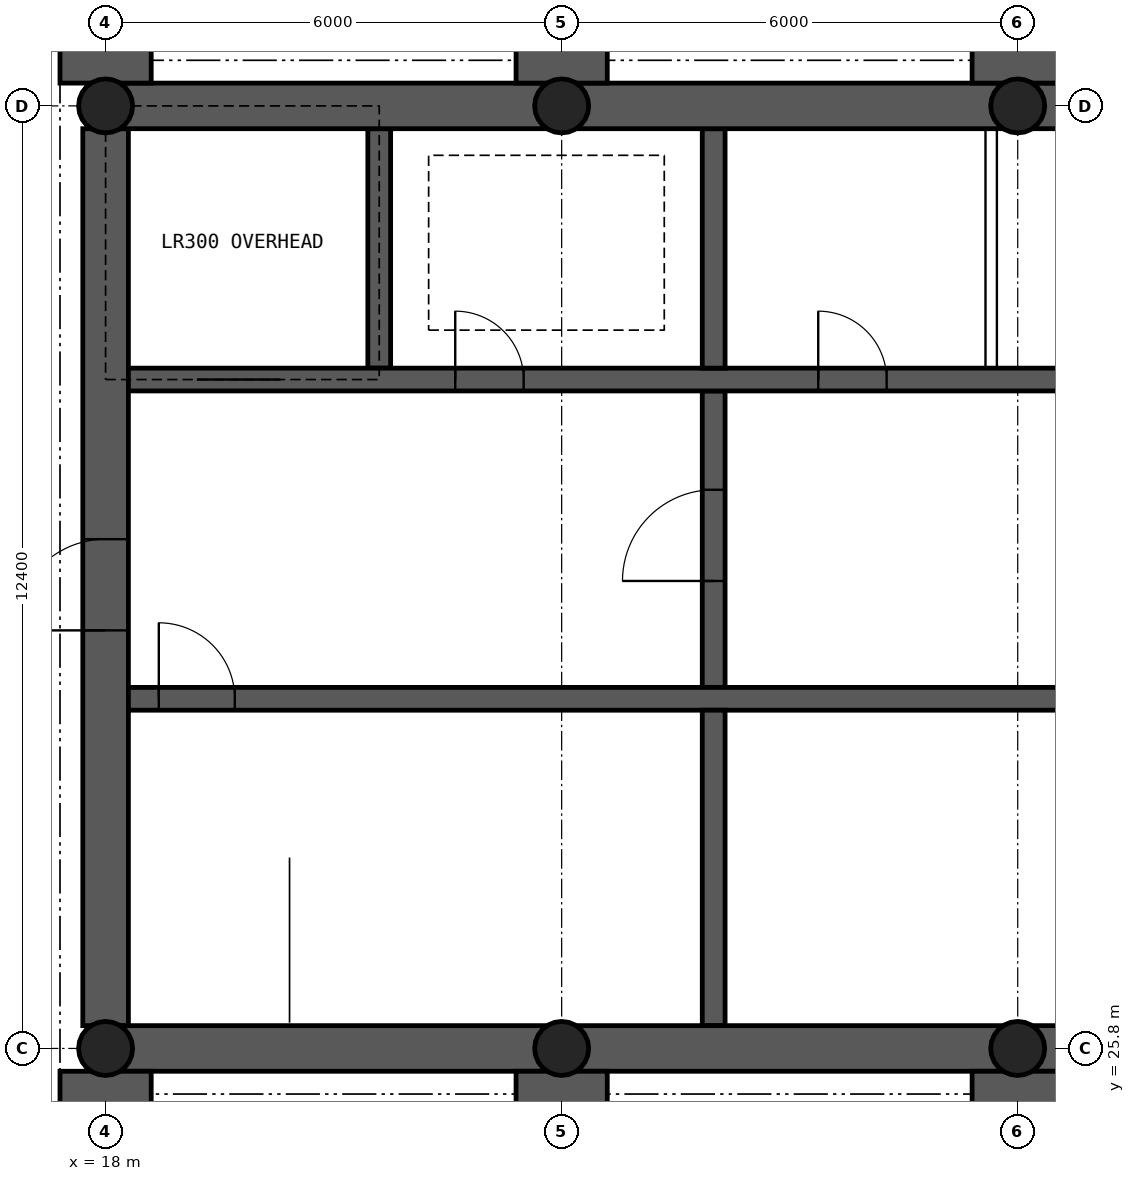
"""IFC4 building model, lengths in metres.
Left out: names, types, materials, properties, quantities, classifications, styles, units other than length and angle.
Written with IfcOpenShell. Run it as: python <this file> out.ifc"""

import sys

from ifc_helpers import new_model, si_unit, direction, frame, frame_2d, origin, origin_2d, place, context, subcontext, project, spatial, rectangle, hollow_circle, extrude, element, fill, save


model = new_model("IFC4")
c1 = context("Model", 3, precision=1e-05, world=origin(), true_north=direction((0.0, 1.0)))
c2 = subcontext(c1, "Body", "Model", "MODEL_VIEW")
j1 = project(units=[si_unit("LENGTHUNIT", "METRE"), si_unit("PLANEANGLEUNIT", "RADIAN")], contexts=[c1])
p1 = place(None, origin())
s1 = spatial("IfcSite", under=j1, at=p1, CompositionType="ELEMENT")
p2 = place(p1, origin())
s2 = spatial("IfcBuilding", under=s1, at=p2, CompositionType="ELEMENT")
p3 = place(p2, frame((0.0, 0.0, 262.3)))
s3 = spatial("IfcBuildingStorey", under=s2, at=p3, CompositionType="ELEMENT", Elevation=262.3)
for number, where, z_axis, x_axis in (
    (1, (18.0, 25.8, 0.0), (0.0, 0.0, 1.0), (1.0, 0.0, 0.0)),
    (2, (18.0, 38.2, 0.0), (0.0, 0.0, 1.0), (1.0, 0.0, 0.0)),
):
    element("IfcWall", number, at=place(p3, frame(where, z_axis=z_axis, x_axis=x_axis)), inside=s3, PredefinedType="SHEAR", context=c2, shape_type="SweptSolid", body=[
        extrude(rectangle(XDim=48.0, YDim=0.6, at=frame_2d((24.0, 0.0))), origin(), (0.0, 0.0, 1.0), 6.0),
    ])
p4 = place(p3, frame((18.0, 26.1, 0.0), z_axis=(0.0, 0.0, 1.0), x_axis=(0.0, 1.0, 0.0)))
e3 = element("IfcWall", 3, at=p4, inside=s3, PredefinedType="SHEAR", context=c2, shape_type="SweptSolid", body=[
    extrude(rectangle(XDim=11.8, YDim=0.6, at=frame_2d((5.9, 0.0))), origin(), (0.0, 0.0, 1.0), 6.0),
])
p5 = place(p4, frame((5.2, 0.0, 0.0)))
e4 = element("IfcOpeningElement", 4, at=p5, cuts=e3, PredefinedType="OPENING", context=c2, shape_type="SweptSolid", body=[
    extrude(rectangle(XDim=1.2, YDim=2.1, at=frame_2d((0.6, 1.05))), frame((0.0, 0.31, 0.0), z_axis=(0.0, -1.0, 0.0), x_axis=(1.0, 0.0, 0.0)), (0.0, 0.0, 1.0), 0.62),
])
p6 = place(p3, frame((18.3, 30.4, 0.0), z_axis=(0.0, 0.0, 1.0), x_axis=(1.0, 0.0, 0.0)))
e5 = element("IfcWall", 5, at=p6, inside=s3, PredefinedType="SHEAR", context=c2, shape_type="SweptSolid", body=[
    extrude(rectangle(XDim=47.4, YDim=0.3, at=frame_2d((23.7, 0.0))), origin(), (0.0, 0.0, 1.0), 6.0),
])
p7 = place(p6, frame((0.4, 0.0, 0.0)))
e6 = element("IfcOpeningElement", 6, at=p7, cuts=e5, PredefinedType="OPENING", context=c2, shape_type="SweptSolid", body=[
    extrude(rectangle(XDim=1.0, YDim=2.1, at=frame_2d((0.5, 1.05))), frame((0.0, 0.16, 0.0), z_axis=(0.0, -1.0, 0.0), x_axis=(1.0, 0.0, 0.0)), (0.0, 0.0, 1.0), 0.32),
])
p8 = place(p6, frame((46.0, 0.0, 0.0)))
e7 = element("IfcOpeningElement", 7, at=p8, cuts=e5, PredefinedType="OPENING", context=c2, shape_type="SweptSolid", body=[
    extrude(rectangle(XDim=1.0, YDim=2.1, at=frame_2d((0.5, 1.05))), frame((0.0, 0.16, 0.0), z_axis=(0.0, -1.0, 0.0), x_axis=(1.0, 0.0, 0.0)), (0.0, 0.0, 1.0), 0.32),
])
p9 = place(p6, frame((19.025, 0.0, 0.0)))
e8 = element("IfcOpeningElement", 8, at=p9, cuts=e5, PredefinedType="OPENING", context=c2, shape_type="SweptSolid", body=[
    extrude(rectangle(XDim=0.9, YDim=2.1, at=frame_2d((0.45, 1.05))), frame((0.0, 0.16, 0.0), z_axis=(0.0, -1.0, 0.0), x_axis=(1.0, 0.0, 0.0)), (0.0, 0.0, 1.0), 0.32),
])
p10 = place(p6, frame((24.525, 0.0, 0.0)))
e9 = element("IfcOpeningElement", 9, at=p10, cuts=e5, PredefinedType="OPENING", context=c2, shape_type="SweptSolid", body=[
    extrude(rectangle(XDim=0.9, YDim=2.1, at=frame_2d((0.45, 1.05))), frame((0.0, 0.16, 0.0), z_axis=(0.0, -1.0, 0.0), x_axis=(1.0, 0.0, 0.0)), (0.0, 0.0, 1.0), 0.32),
])
p11 = place(p6, frame((30.317, 0.0, 0.0)))
e10 = element("IfcOpeningElement", 10, at=p11, cuts=e5, PredefinedType="OPENING", context=c2, shape_type="SweptSolid", body=[
    extrude(rectangle(XDim=1.1, YDim=2.1, at=frame_2d((0.55, 1.05))), frame((0.0, 0.16, 0.0), z_axis=(0.0, -1.0, 0.0), x_axis=(1.0, 0.0, 0.0)), (0.0, 0.0, 1.0), 0.32),
])
p12 = place(p6, frame((33.85, 0.0, 0.0)))
e11 = element("IfcOpeningElement", 11, at=p12, cuts=e5, PredefinedType="OPENING", context=c2, shape_type="SweptSolid", body=[
    extrude(rectangle(XDim=1.1, YDim=2.1, at=frame_2d((0.55, 1.05))), frame((0.0, 0.16, 0.0), z_axis=(0.0, -1.0, 0.0), x_axis=(1.0, 0.0, 0.0)), (0.0, 0.0, 1.0), 0.32),
])
p13 = place(p6, frame((37.383, 0.0, 0.0)))
e12 = element("IfcOpeningElement", 12, at=p13, cuts=e5, PredefinedType="OPENING", context=c2, shape_type="SweptSolid", body=[
    extrude(rectangle(XDim=1.1, YDim=2.1, at=frame_2d((0.55, 1.05))), frame((0.0, 0.16, 0.0), z_axis=(0.0, -1.0, 0.0), x_axis=(1.0, 0.0, 0.0)), (0.0, 0.0, 1.0), 0.32),
])
p14 = place(p3, frame((18.3, 34.6, 0.0), z_axis=(0.0, 0.0, 1.0), x_axis=(1.0, 0.0, 0.0)))
e13 = element("IfcWall", 13, at=p14, inside=s3, PredefinedType="SHEAR", context=c2, shape_type="SweptSolid", body=[
    extrude(rectangle(XDim=47.4, YDim=0.3, at=frame_2d((23.7, 0.0))), origin(), (0.0, 0.0, 1.0), 6.0),
])
p15 = place(p14, frame((0.9, 0.0, 0.0)))
e14 = element("IfcOpeningElement", 14, at=p15, cuts=e13, PredefinedType="OPENING", context=c2, shape_type="SweptSolid", body=[
    extrude(rectangle(XDim=1.1, YDim=2.1, at=frame_2d((0.55, 1.05))), frame((0.0, 0.16, 0.0), z_axis=(0.0, -1.0, 0.0), x_axis=(1.0, 0.0, 0.0)), (0.0, 0.0, 1.0), 0.32),
])
p16 = place(p14, frame((45.4, 0.0, 0.0)))
e15 = element("IfcOpeningElement", 15, at=p16, cuts=e13, PredefinedType="OPENING", context=c2, shape_type="SweptSolid", body=[
    extrude(rectangle(XDim=1.1, YDim=2.1, at=frame_2d((0.55, 1.05))), frame((0.0, 0.16, 0.0), z_axis=(0.0, -1.0, 0.0), x_axis=(1.0, 0.0, 0.0)), (0.0, 0.0, 1.0), 0.32),
])
p17 = place(p14, frame((4.3, 0.0, 0.0)))
e16 = element("IfcOpeningElement", 16, at=p17, cuts=e13, PredefinedType="OPENING", context=c2, shape_type="SweptSolid", body=[
    extrude(rectangle(XDim=0.9, YDim=2.1, at=frame_2d((0.45, 1.05))), frame((0.0, 0.16, 0.0), z_axis=(0.0, -1.0, 0.0), x_axis=(1.0, 0.0, 0.0)), (0.0, 0.0, 1.0), 0.32),
])
p18 = place(p14, frame((42.2, 0.0, 0.0)))
e17 = element("IfcOpeningElement", 17, at=p18, cuts=e13, PredefinedType="OPENING", context=c2, shape_type="SweptSolid", body=[
    extrude(rectangle(XDim=0.9, YDim=2.1, at=frame_2d((0.45, 1.05))), frame((0.0, 0.16, 0.0), z_axis=(0.0, -1.0, 0.0), x_axis=(1.0, 0.0, 0.0)), (0.0, 0.0, 1.0), 0.32),
])
p19 = place(p14, frame((9.075, 0.0, 0.0)))
e18 = element("IfcOpeningElement", 18, at=p19, cuts=e13, PredefinedType="OPENING", context=c2, shape_type="SweptSolid", body=[
    extrude(rectangle(XDim=0.9, YDim=2.1, at=frame_2d((0.45, 1.05))), frame((0.0, 0.16, 0.0), z_axis=(0.0, -1.0, 0.0), x_axis=(1.0, 0.0, 0.0)), (0.0, 0.0, 1.0), 0.32),
])
p20 = place(p14, frame((13.049, 0.0, 0.0)))
e19 = element("IfcOpeningElement", 19, at=p20, cuts=e13, PredefinedType="OPENING", context=c2, shape_type="SweptSolid", body=[
    extrude(rectangle(XDim=0.9, YDim=2.1, at=frame_2d((0.45, 1.05))), frame((0.0, 0.16, 0.0), z_axis=(0.0, -1.0, 0.0), x_axis=(1.0, 0.0, 0.0)), (0.0, 0.0, 1.0), 0.32),
])
p21 = place(p14, frame((16.696, 0.0, 0.0)))
e20 = element("IfcOpeningElement", 20, at=p21, cuts=e13, PredefinedType="OPENING", context=c2, shape_type="SweptSolid", body=[
    extrude(rectangle(XDim=0.9, YDim=2.1, at=frame_2d((0.45, 1.05))), frame((0.0, 0.16, 0.0), z_axis=(0.0, -1.0, 0.0), x_axis=(1.0, 0.0, 0.0)), (0.0, 0.0, 1.0), 0.32),
])
p22 = place(p14, frame((20.455, 0.0, 0.0)))
e21 = element("IfcOpeningElement", 21, at=p22, cuts=e13, PredefinedType="OPENING", context=c2, shape_type="SweptSolid", body=[
    extrude(rectangle(XDim=0.9, YDim=2.1, at=frame_2d((0.45, 1.05))), frame((0.0, 0.16, 0.0), z_axis=(0.0, -1.0, 0.0), x_axis=(1.0, 0.0, 0.0)), (0.0, 0.0, 1.0), 0.32),
])
p23 = place(p14, frame((24.861, 0.0, 0.0)))
e22 = element("IfcOpeningElement", 22, at=p23, cuts=e13, PredefinedType="OPENING", context=c2, shape_type="SweptSolid", body=[
    extrude(rectangle(XDim=0.9, YDim=2.1, at=frame_2d((0.45, 1.05))), frame((0.0, 0.16, 0.0), z_axis=(0.0, -1.0, 0.0), x_axis=(1.0, 0.0, 0.0)), (0.0, 0.0, 1.0), 0.32),
])
p24 = place(p14, frame((27.658, 0.0, 0.0)))
e23 = element("IfcOpeningElement", 23, at=p24, cuts=e13, PredefinedType="OPENING", context=c2, shape_type="SweptSolid", body=[
    extrude(rectangle(XDim=0.9, YDim=2.1, at=frame_2d((0.45, 1.05))), frame((0.0, 0.16, 0.0), z_axis=(0.0, -1.0, 0.0), x_axis=(1.0, 0.0, 0.0)), (0.0, 0.0, 1.0), 0.32),
])
p25 = place(p14, frame((30.031, 0.0, 0.0)))
e24 = element("IfcOpeningElement", 24, at=p25, cuts=e13, PredefinedType="OPENING", context=c2, shape_type="SweptSolid", body=[
    extrude(rectangle(XDim=0.9, YDim=2.1, at=frame_2d((0.45, 1.05))), frame((0.0, 0.16, 0.0), z_axis=(0.0, -1.0, 0.0), x_axis=(1.0, 0.0, 0.0)), (0.0, 0.0, 1.0), 0.32),
])
p26 = place(p14, frame((33.881, 0.0, 0.0)))
e25 = element("IfcOpeningElement", 25, at=p26, cuts=e13, PredefinedType="OPENING", context=c2, shape_type="SweptSolid", body=[
    extrude(rectangle(XDim=0.9, YDim=2.1, at=frame_2d((0.45, 1.05))), frame((0.0, 0.16, 0.0), z_axis=(0.0, -1.0, 0.0), x_axis=(1.0, 0.0, 0.0)), (0.0, 0.0, 1.0), 0.32),
])
p27 = place(p14, frame((37.629, 0.0, 0.0)))
e26 = element("IfcOpeningElement", 26, at=p27, cuts=e13, PredefinedType="OPENING", context=c2, shape_type="SweptSolid", body=[
    extrude(rectangle(XDim=0.9, YDim=2.1, at=frame_2d((0.45, 1.05))), frame((0.0, 0.16, 0.0), z_axis=(0.0, -1.0, 0.0), x_axis=(1.0, 0.0, 0.0)), (0.0, 0.0, 1.0), 0.32),
])
p28 = place(p3, frame((26.0, 26.1, 0.0), z_axis=(0.0, 0.0, 1.0), x_axis=(0.0, 1.0, 0.0)))
e27 = element("IfcWall", 27, at=p28, inside=s3, PredefinedType="SHEAR", context=c2, shape_type="SweptSolid", body=[
    extrude(rectangle(XDim=4.15, YDim=0.3, at=frame_2d((2.075, 0.0))), origin(), (0.0, 0.0, 1.0), 6.0),
])
p29 = place(p3, frame((26.0, 30.55, 0.0), z_axis=(0.0, 0.0, 1.0), x_axis=(0.0, 1.0, 0.0)))
e28 = element("IfcWall", 28, at=p29, inside=s3, PredefinedType="SHEAR", context=c2, shape_type="SweptSolid", body=[
    extrude(rectangle(XDim=3.9, YDim=0.3, at=frame_2d((1.95, 0.0))), origin(), (0.0, 0.0, 1.0), 6.0),
])
p30 = place(p29, frame((1.4, 0.0, 0.0)))
e29 = element("IfcOpeningElement", 29, at=p30, cuts=e28, PredefinedType="OPENING", context=c2, shape_type="SweptSolid", body=[
    extrude(rectangle(XDim=1.2, YDim=2.1, at=frame_2d((0.6, 1.05))), frame((0.0, 0.16, 0.0), z_axis=(0.0, -1.0, 0.0), x_axis=(1.0, 0.0, 0.0)), (0.0, 0.0, 1.0), 0.32),
])
for number, where, z_axis, x_axis in (
    (30, (21.6, 34.75, 0.0), (0.0, 0.0, 1.0), (0.0, 1.0, 0.0)),
    (31, (26.0, 34.75, 0.0), (0.0, 0.0, 1.0), (0.0, 1.0, 0.0)),
):
    element("IfcWall", number, at=place(p3, frame(where, z_axis=z_axis, x_axis=x_axis)), inside=s3, PredefinedType="SHEAR", context=c2, shape_type="SweptSolid", body=[
        extrude(rectangle(XDim=3.15, YDim=0.3, at=frame_2d((1.575, 0.0))), origin(), (0.0, 0.0, 1.0), 6.0),
    ])
p31 = place(p3, frame((18.0, 12.05, 0.0), z_axis=(0.0, 0.0, 1.0), x_axis=(0.0, 1.0, 0.0)))
e32 = element("IfcWall", 32, at=p31, inside=s3, PredefinedType="SHEAR", context=c2, shape_type="SweptSolid", body=[
    extrude(rectangle(XDim=13.45, YDim=1.2, at=frame_2d((6.725, 0.0))), origin(), (0.0, 0.0, 1.0), 4.4),
])
p32 = place(p31, frame((6.25, 0.0, 0.0)))
e33 = element("IfcOpeningElement", 33, at=p32, cuts=e32, PredefinedType="OPENING", context=c2, shape_type="SweptSolid", body=[
    extrude(rectangle(XDim=1.0, YDim=2.1, at=frame_2d((0.5, 1.05))), frame((0.0, 0.61, 0.0), z_axis=(0.0, -1.0, 0.0), x_axis=(1.0, 0.0, 0.0)), (0.0, 0.0, 1.0), 1.22),
])
p33 = place(p3, frame((18.0, 38.5, 0.0), z_axis=(0.0, 0.0, 1.0), x_axis=(0.0, 1.0, 0.0)))
e34 = element("IfcWall", 34, at=p33, inside=s3, PredefinedType="SHEAR", context=c2, shape_type="SweptSolid", body=[
    extrude(rectangle(XDim=13.45, YDim=1.2, at=frame_2d((6.725, 0.0))), origin(), (0.0, 0.0, 1.0), 4.4),
])
p34 = place(p33, frame((6.2, 0.0, 0.0)))
e35 = element("IfcOpeningElement", 35, at=p34, cuts=e34, PredefinedType="OPENING", context=c2, shape_type="SweptSolid", body=[
    extrude(rectangle(XDim=1.0, YDim=2.1, at=frame_2d((0.5, 1.05))), frame((0.0, 0.61, 0.0), z_axis=(0.0, -1.0, 0.0), x_axis=(1.0, 0.0, 0.0)), (0.0, 0.0, 1.0), 1.22),
])
p35 = place(p3, frame((24.0, 12.05, 0.0), z_axis=(0.0, 0.0, 1.0), x_axis=(0.0, 1.0, 0.0)))
e36 = element("IfcWall", 36, at=p35, inside=s3, PredefinedType="SHEAR", context=c2, shape_type="SweptSolid", body=[
    extrude(rectangle(XDim=13.45, YDim=1.2, at=frame_2d((6.725, 0.0))), origin(), (0.0, 0.0, 1.0), 4.4),
])
p36 = place(p35, frame((6.25, 0.0, 0.0)))
e37 = element("IfcOpeningElement", 37, at=p36, cuts=e36, PredefinedType="OPENING", context=c2, shape_type="SweptSolid", body=[
    extrude(rectangle(XDim=1.0, YDim=2.1, at=frame_2d((0.5, 1.05))), frame((0.0, 0.61, 0.0), z_axis=(0.0, -1.0, 0.0), x_axis=(1.0, 0.0, 0.0)), (0.0, 0.0, 1.0), 1.22),
])
p37 = place(p3, frame((24.0, 38.5, 0.0), z_axis=(0.0, 0.0, 1.0), x_axis=(0.0, 1.0, 0.0)))
e38 = element("IfcWall", 38, at=p37, inside=s3, PredefinedType="SHEAR", context=c2, shape_type="SweptSolid", body=[
    extrude(rectangle(XDim=13.45, YDim=1.2, at=frame_2d((6.725, 0.0))), origin(), (0.0, 0.0, 1.0), 4.4),
])
p38 = place(p37, frame((6.2, 0.0, 0.0)))
e39 = element("IfcOpeningElement", 39, at=p38, cuts=e38, PredefinedType="OPENING", context=c2, shape_type="SweptSolid", body=[
    extrude(rectangle(XDim=1.0, YDim=2.1, at=frame_2d((0.5, 1.05))), frame((0.0, 0.61, 0.0), z_axis=(0.0, -1.0, 0.0), x_axis=(1.0, 0.0, 0.0)), (0.0, 0.0, 1.0), 1.22),
])
p39 = place(p3, frame((30.0, 12.05, 0.0), z_axis=(0.0, 0.0, 1.0), x_axis=(0.0, 1.0, 0.0)))
e40 = element("IfcWall", 40, at=p39, inside=s3, PredefinedType="SHEAR", context=c2, shape_type="SweptSolid", body=[
    extrude(rectangle(XDim=13.45, YDim=1.2, at=frame_2d((6.725, 0.0))), origin(), (0.0, 0.0, 1.0), 4.4),
])
p40 = place(p39, frame((6.25, 0.0, 0.0)))
e41 = element("IfcOpeningElement", 41, at=p40, cuts=e40, PredefinedType="OPENING", context=c2, shape_type="SweptSolid", body=[
    extrude(rectangle(XDim=1.0, YDim=2.1, at=frame_2d((0.5, 1.05))), frame((0.0, 0.61, 0.0), z_axis=(0.0, -1.0, 0.0), x_axis=(1.0, 0.0, 0.0)), (0.0, 0.0, 1.0), 1.22),
])
p41 = place(p3, frame((30.0, 38.5, 0.0), z_axis=(0.0, 0.0, 1.0), x_axis=(0.0, 1.0, 0.0)))
e42 = element("IfcWall", 42, at=p41, inside=s3, PredefinedType="SHEAR", context=c2, shape_type="SweptSolid", body=[
    extrude(rectangle(XDim=13.45, YDim=1.2, at=frame_2d((6.725, 0.0))), origin(), (0.0, 0.0, 1.0), 4.4),
])
p42 = place(p41, frame((6.2, 0.0, 0.0)))
e43 = element("IfcOpeningElement", 43, at=p42, cuts=e42, PredefinedType="OPENING", context=c2, shape_type="SweptSolid", body=[
    extrude(rectangle(XDim=1.0, YDim=2.1, at=frame_2d((0.5, 1.05))), frame((0.0, 0.61, 0.0), z_axis=(0.0, -1.0, 0.0), x_axis=(1.0, 0.0, 0.0)), (0.0, 0.0, 1.0), 1.22),
])
p43 = place(p3, frame((18.0, 25.8, 0.0), z_axis=(0.0, 0.0, 1.0), x_axis=(1.0, 0.0, 0.0)))
e44 = element("IfcColumn", 44, at=p43, inside=s3, PredefinedType="COLUMN", context=c2, shape_type="SweptSolid", body=[
    extrude(hollow_circle(Radius=0.355, WallThickness=0.025, at=origin_2d()), origin(), (0.0, 0.0, 1.0), 8.426),
])
p44 = place(p3, frame((18.0, 38.2, 0.0), z_axis=(0.0, 0.0, 1.0), x_axis=(1.0, 0.0, 0.0)))
e45 = element("IfcColumn", 45, at=p44, inside=s3, PredefinedType="COLUMN", context=c2, shape_type="SweptSolid", body=[
    extrude(hollow_circle(Radius=0.355, WallThickness=0.025, at=origin_2d()), origin(), (0.0, 0.0, 1.0), 11.517),
])
p45 = place(p3, frame((24.0, 25.8, 0.0), z_axis=(0.0, 0.0, 1.0), x_axis=(1.0, 0.0, 0.0)))
e46 = element("IfcColumn", 46, at=p45, inside=s3, PredefinedType="COLUMN", context=c2, shape_type="SweptSolid", body=[
    extrude(hollow_circle(Radius=0.355, WallThickness=0.025, at=origin_2d()), origin(), (0.0, 0.0, 1.0), 8.426),
])
p46 = place(p3, frame((24.0, 38.2, 0.0), z_axis=(0.0, 0.0, 1.0), x_axis=(1.0, 0.0, 0.0)))
e47 = element("IfcColumn", 47, at=p46, inside=s3, PredefinedType="COLUMN", context=c2, shape_type="SweptSolid", body=[
    extrude(hollow_circle(Radius=0.355, WallThickness=0.025, at=origin_2d()), origin(), (0.0, 0.0, 1.0), 11.517),
])
p47 = place(p3, frame((30.0, 25.8, 0.0), z_axis=(0.0, 0.0, 1.0), x_axis=(1.0, 0.0, 0.0)))
e48 = element("IfcColumn", 48, at=p47, inside=s3, PredefinedType="COLUMN", context=c2, shape_type="SweptSolid", body=[
    extrude(hollow_circle(Radius=0.355, WallThickness=0.025, at=origin_2d()), origin(), (0.0, 0.0, 1.0), 8.426),
])
p48 = place(p3, frame((30.0, 38.2, 0.0), z_axis=(0.0, 0.0, 1.0), x_axis=(1.0, 0.0, 0.0)))
e49 = element("IfcColumn", 49, at=p48, inside=s3, PredefinedType="COLUMN", context=c2, shape_type="SweptSolid", body=[
    extrude(hollow_circle(Radius=0.355, WallThickness=0.025, at=origin_2d()), origin(), (0.0, 0.0, 1.0), 11.517),
])
p49 = place(p3, frame((29.651, 34.75, 0.0), z_axis=(0.0, 0.0, 1.0), x_axis=(0.0, 1.0, 0.0)))
e50 = element("IfcWall", 50, at=p49, inside=s3, PredefinedType="SOLIDWALL", context=c2, shape_type="SweptSolid", body=[
    extrude(rectangle(XDim=3.15, YDim=0.15, at=frame_2d((1.575, 0.0))), origin(), (0.0, 0.0, 1.0), 6.0),
])
p50 = place(p5, origin())
e51 = element("IfcDoor", 51, at=p50, inside=s3, OperationType="SINGLE_SWING_LEFT", PredefinedType="DOOR", context=c2, shape_type="SweptSolid", body=[
    extrude(rectangle(XDim=1.2, YDim=2.1, at=frame_2d((0.6, 1.05))), frame((0.0, 0.025, 0.0), z_axis=(0.0, -1.0, 0.0), x_axis=(1.0, 0.0, 0.0)), (0.0, 0.0, 1.0), 0.05),
])
fill(e4, e51)
p51 = place(p7, origin())
e52 = element("IfcDoor", 52, at=p51, inside=s3, OperationType="SINGLE_SWING_LEFT", PredefinedType="DOOR", context=c2, shape_type="SweptSolid", body=[
    extrude(rectangle(XDim=1.0, YDim=2.1, at=frame_2d((0.5, 1.05))), frame((0.0, 0.025, 0.0), z_axis=(0.0, -1.0, 0.0), x_axis=(1.0, 0.0, 0.0)), (0.0, 0.0, 1.0), 0.05),
])
fill(e6, e52)
p52 = place(p15, origin())
e53 = element("IfcDoor", 53, at=p52, inside=s3, OperationType="DOUBLE_DOOR_SLIDING", PredefinedType="DOOR", context=c2, shape_type="SweptSolid", body=[
    extrude(rectangle(XDim=1.1, YDim=2.1, at=frame_2d((0.55, 1.05))), frame((0.0, 0.025, 0.0), z_axis=(0.0, -1.0, 0.0), x_axis=(1.0, 0.0, 0.0)), (0.0, 0.0, 1.0), 0.05),
])
fill(e14, e53)
p53 = place(p17, origin())
e54 = element("IfcDoor", 54, at=p53, inside=s3, OperationType="SINGLE_SWING_LEFT", PredefinedType="DOOR", context=c2, shape_type="SweptSolid", body=[
    extrude(rectangle(XDim=0.9, YDim=2.1, at=frame_2d((0.45, 1.05))), frame((0.0, 0.025, 0.0), z_axis=(0.0, -1.0, 0.0), x_axis=(1.0, 0.0, 0.0)), (0.0, 0.0, 1.0), 0.05),
])
fill(e16, e54)
p54 = place(p30, origin())
e55 = element("IfcDoor", 55, at=p54, inside=s3, OperationType="SINGLE_SWING_LEFT", PredefinedType="DOOR", context=c2, shape_type="SweptSolid", body=[
    extrude(rectangle(XDim=1.2, YDim=2.1, at=frame_2d((0.6, 1.05))), frame((0.0, 0.025, 0.0), z_axis=(0.0, -1.0, 0.0), x_axis=(1.0, 0.0, 0.0)), (0.0, 0.0, 1.0), 0.05),
])
fill(e29, e55)
p55 = place(p19, origin())
e56 = element("IfcDoor", 56, at=p55, inside=s3, OperationType="SINGLE_SWING_LEFT", PredefinedType="DOOR", context=c2, shape_type="SweptSolid", body=[
    extrude(rectangle(XDim=0.9, YDim=2.1, at=frame_2d((0.45, 1.05))), frame((0.0, 0.025, 0.0), z_axis=(0.0, -1.0, 0.0), x_axis=(1.0, 0.0, 0.0)), (0.0, 0.0, 1.0), 0.05),
])
fill(e18, e56)
save(model, sys.argv[1])
